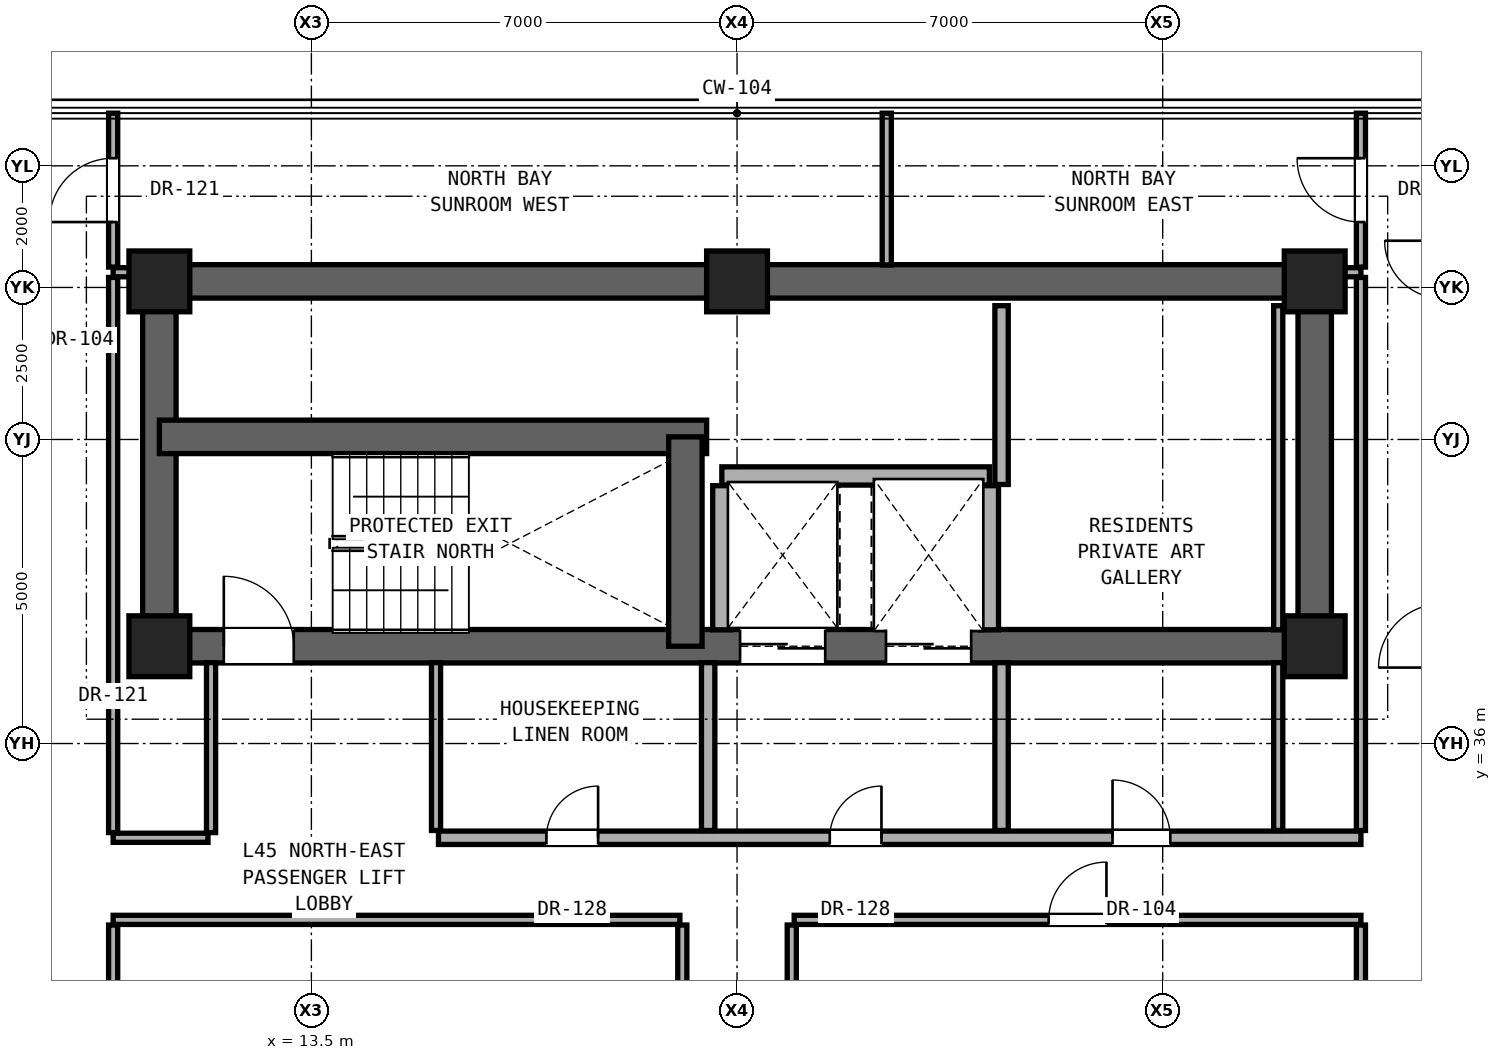
"""IFC4 building model, lengths in metres.
Left out: names, types, materials, properties, quantities, classifications, styles, units other than length and angle.
Written with IfcOpenShell. Run it as: python <this file> out.ifc"""

import sys

from ifc_helpers import new_model, si_unit, direction, frame, frame_2d, origin, origin_2d, place, context, subcontext, project, spatial, rectangle, extrude, element, fill, save


model = new_model("IFC4")
c1 = context("Model", 3, precision=1e-05, world=origin(), true_north=direction((0.0, 1.0)))
c2 = subcontext(c1, "Body", "Model", "MODEL_VIEW")
j1 = project(units=[si_unit("LENGTHUNIT", "METRE"), si_unit("PLANEANGLEUNIT", "RADIAN")], contexts=[c1])
p1 = place(None, origin())
s1 = spatial("IfcSite", under=j1, at=p1, CompositionType="ELEMENT")
p2 = place(p1, origin())
s2 = spatial("IfcBuilding", under=s1, at=p2, CompositionType="ELEMENT")
p3 = place(p2, frame((0.0, 0.0, 160.9)))
s3 = spatial("IfcBuildingStorey", under=s2, at=p3, CompositionType="ELEMENT", Elevation=160.9)
for number, where, z_axis, x_axis in (
    (1, (11.0, 37.6, 0.0), (0.0, 0.0, 1.0), (1.0, 0.0, 0.0)),
    (2, (30.0, 37.6, 0.0), (0.0, 0.0, 1.0), (1.0, 0.0, 0.0)),
    (3, (11.0, 43.6, 0.0), (0.0, 0.0, 1.0), (1.0, 0.0, 0.0)),
    (4, (20.5, 43.6, 0.0), (0.0, 0.0, 1.0), (1.0, 0.0, 0.0)),
    (5, (30.0, 43.6, 0.0), (0.0, 0.0, 1.0), (1.0, 0.0, 0.0)),
):
    element("IfcColumn", number, at=place(p3, frame(where, z_axis=z_axis, x_axis=x_axis)), inside=s3, PredefinedType="COLUMN", context=c2, shape_type="SweptSolid", body=[
        extrude(rectangle(XDim=1.0, YDim=1.0, at=origin_2d()), origin(), (0.0, 0.0, 1.0), 3.25),
    ])
p4 = place(p3, frame((11.0, 43.6, 0.0), z_axis=(0.0, 0.0, 1.0), x_axis=(1.0, 0.0, 0.0)))
e6 = element("IfcWall", 6, at=p4, inside=s3, PredefinedType="SHEAR", context=c2, shape_type="SweptSolid", body=[
    extrude(rectangle(XDim=19.0, YDim=0.55, at=frame_2d((9.5, 0.0))), origin(), (0.0, 0.0, 1.0), 3.05),
])
for number, where, z_axis, x_axis in (
    (7, (11.0, 37.6, 0.0), (0.0, 0.0, 1.0), (0.0, 1.0, 0.0)),
    (8, (30.0, 37.6, 0.0), (0.0, 0.0, 1.0), (0.0, 1.0, 0.0)),
):
    element("IfcWall", number, at=place(p3, frame(where, z_axis=z_axis, x_axis=x_axis)), inside=s3, PredefinedType="SHEAR", context=c2, shape_type="SweptSolid", body=[
        extrude(rectangle(XDim=6.0, YDim=0.55, at=frame_2d((3.0, 0.0))), origin(), (0.0, 0.0, 1.0), 3.05),
    ])
p5 = place(p3, frame((11.0, 37.6, 0.0), z_axis=(0.0, 0.0, 1.0), x_axis=(1.0, 0.0, 0.0)))
e9 = element("IfcWall", 9, at=p5, inside=s3, PredefinedType="SHEAR", context=c2, shape_type="SweptSolid", body=[
    extrude(rectangle(XDim=19.0, YDim=0.55, at=frame_2d((9.5, 0.0))), origin(), (0.0, 0.0, 1.0), 3.05),
])
p6 = place(p5, frame((1.06, 0.0, 0.0)))
e10 = element("IfcOpeningElement", 10, at=p6, cuts=e9, PredefinedType="OPENING", context=c2, shape_type="SweptSolid", body=[
    extrude(rectangle(XDim=1.15, YDim=2.2, at=frame_2d((0.575, 1.1))), frame((0.0, 0.285, 0.0), z_axis=(0.0, -1.0, 0.0), x_axis=(1.0, 0.0, 0.0)), (0.0, 0.0, 1.0), 0.57),
])
p7 = place(p5, frame((9.55, 0.0, 0.0)))
e11 = element("IfcOpeningElement", 11, at=p7, cuts=e9, PredefinedType="OPENING", context=c2, shape_type="SweptSolid", body=[
    extrude(rectangle(XDim=1.4, YDim=2.35, at=frame_2d((0.7, 1.175))), frame((0.0, 0.285, 0.0), z_axis=(0.0, -1.0, 0.0), x_axis=(1.0, 0.0, 0.0)), (0.0, 0.0, 1.0), 0.57),
])
p8 = place(p5, frame((11.95, 0.0, 0.0)))
e12 = element("IfcOpeningElement", 12, at=p8, cuts=e9, PredefinedType="OPENING", context=c2, shape_type="SweptSolid", body=[
    extrude(rectangle(XDim=1.4, YDim=2.35, at=frame_2d((0.7, 1.175))), frame((0.0, 0.285, 0.0), z_axis=(0.0, -1.0, 0.0), x_axis=(1.0, 0.0, 0.0)), (0.0, 0.0, 1.0), 0.57),
])
p9 = place(p3, frame((11.0, 41.043, 0.0), z_axis=(0.0, 0.0, 1.0), x_axis=(1.0, 0.0, 0.0)))
e13 = element("IfcWall", 13, at=p9, inside=s3, PredefinedType="SHEAR", context=c2, shape_type="SweptSolid", body=[
    extrude(rectangle(XDim=9.0, YDim=0.55, at=frame_2d((4.5, 0.0))), origin(), (0.0, 0.0, 1.0), 3.05),
])
p10 = place(p3, frame((19.65, 37.6, 0.0), z_axis=(0.0, 0.0, 1.0), x_axis=(0.0, 1.0, 0.0)))
e14 = element("IfcWall", 14, at=p10, inside=s3, PredefinedType="SHEAR", context=c2, shape_type="SweptSolid", body=[
    extrude(rectangle(XDim=3.443, YDim=0.55, at=frame_2d((1.721, 0.0))), origin(), (0.0, 0.0, 1.0), 3.05),
])
p11 = place(p3, frame((10.24, 33.1, 0.0), z_axis=(0.0, 0.0, 1.0), x_axis=(1.0, 0.0, 0.0)))
e15 = element("IfcWall", 15, at=p11, inside=s3, PredefinedType="PARTITIONING", context=c2, shape_type="SweptSolid", body=[
    extrude(rectangle(XDim=9.32, YDim=0.15, at=frame_2d((4.66, 0.0))), origin(), (0.0, 0.0, 1.0), 2.186),
])
p12 = place(p3, frame((21.44, 33.1, 0.0), z_axis=(0.0, 0.0, 1.0), x_axis=(1.0, 0.0, 0.0)))
e16 = element("IfcWall", 16, at=p12, inside=s3, PredefinedType="PARTITIONING", context=c2, shape_type="SweptSolid", body=[
    extrude(rectangle(XDim=9.32, YDim=0.15, at=frame_2d((4.66, 0.0))), origin(), (0.0, 0.0, 1.0), 2.186),
])
p13 = place(p12, frame((4.185, 0.0, 0.0)))
e17 = element("IfcOpeningElement", 17, at=p13, cuts=e16, PredefinedType="OPENING", context=c2, shape_type="SweptSolid", body=[
    extrude(rectangle(XDim=0.95, YDim=2.15, at=frame_2d((0.475, 1.075))), frame((0.0, 0.085, 0.0), z_axis=(0.0, -1.0, 0.0), x_axis=(1.0, 0.0, 0.0)), (0.0, 0.0, 1.0), 0.17),
])
p14 = place(p3, frame((10.24, 34.45, 0.0), z_axis=(0.0, 0.0, 1.0), x_axis=(1.0, 0.0, 0.0)))
e18 = element("IfcWall", 18, at=p14, inside=s3, PredefinedType="PARTITIONING", context=c2, shape_type="SweptSolid", body=[
    extrude(rectangle(XDim=1.56, YDim=0.15, at=frame_2d((0.78, 0.0))), origin(), (0.0, 0.0, 1.0), 2.186),
])
p15 = place(p3, frame((15.59, 34.45, 0.0), z_axis=(0.0, 0.0, 1.0), x_axis=(1.0, 0.0, 0.0)))
e19 = element("IfcWall", 19, at=p15, inside=s3, PredefinedType="SOLIDWALL", context=c2, shape_type="SweptSolid", body=[
    extrude(rectangle(XDim=15.17, YDim=0.22, at=frame_2d((7.585, 0.0))), origin(), (0.0, 0.0, 1.0), 2.186),
])
p16 = place(p15, frame((6.435, 0.0, 0.0)))
e20 = element("IfcOpeningElement", 20, at=p16, cuts=e19, PredefinedType="OPENING", context=c2, shape_type="SweptSolid", body=[
    extrude(rectangle(XDim=0.85, YDim=2.01, at=frame_2d((0.425, 1.005))), frame((0.0, 0.12, 0.0), z_axis=(0.0, -1.0, 0.0), x_axis=(1.0, 0.0, 0.0)), (0.0, 0.0, 1.0), 0.24),
])
p17 = place(p15, frame((11.085, 0.0, 0.0)))
e21 = element("IfcOpeningElement", 21, at=p17, cuts=e19, PredefinedType="OPENING", context=c2, shape_type="SweptSolid", body=[
    extrude(rectangle(XDim=0.95, YDim=2.15, at=frame_2d((0.475, 1.075))), frame((0.0, 0.12, 0.0), z_axis=(0.0, -1.0, 0.0), x_axis=(1.0, 0.0, 0.0)), (0.0, 0.0, 1.0), 0.24),
])
p18 = place(p15, frame((1.775, 0.0, 0.0)))
e22 = element("IfcOpeningElement", 22, at=p18, cuts=e19, PredefinedType="OPENING", context=c2, shape_type="SweptSolid", body=[
    extrude(rectangle(XDim=0.85, YDim=2.01, at=frame_2d((0.425, 1.005))), frame((0.0, 0.12, 0.0), z_axis=(0.0, -1.0, 0.0), x_axis=(1.0, 0.0, 0.0)), (0.0, 0.0, 1.0), 0.24),
])
p19 = place(p3, frame((20.25, 40.4, 0.0), z_axis=(0.0, 0.0, 1.0), x_axis=(1.0, 0.0, 0.0)))
e23 = element("IfcWall", 23, at=p19, inside=s3, PredefinedType="SOLIDWALL", context=c2, shape_type="SweptSolid", body=[
    extrude(rectangle(XDim=4.4, YDim=0.3, at=frame_2d((2.2, 0.0))), origin(), (0.0, 0.0, 1.0), 3.05),
])
for number, where, z_axis, x_axis in (
    (24, (10.24, 43.75, 0.0), (0.0, 0.0, 1.0), (1.0, 0.0, 0.0)),
    (25, (30.27, 43.75, 0.0), (0.0, 0.0, 1.0), (1.0, 0.0, 0.0)),
):
    element("IfcWall", number, at=place(p3, frame(where, z_axis=z_axis, x_axis=x_axis)), inside=s3, PredefinedType="PARTITIONING", context=c2, shape_type="SweptSolid", body=[
        extrude(rectangle(XDim=0.49, YDim=0.15, at=frame_2d((0.245, 0.0))), origin(), (0.0, 0.0, 1.0), 3.05),
    ])
p20 = place(p3, frame((10.24, 27.485, 0.0), z_axis=(0.0, 0.0, 1.0), x_axis=(0.0, 1.0, 0.0)))
e26 = element("IfcWall", 26, at=p20, inside=s3, PredefinedType="PARTITIONING", context=c2, shape_type="SweptSolid", body=[
    extrude(rectangle(XDim=5.53, YDim=0.15, at=frame_2d((2.765, 0.0))), origin(), (0.0, 0.0, 1.0), 2.346),
])
p21 = place(p20, frame((2.29, 0.0, 0.0)))
e27 = element("IfcOpeningElement", 27, at=p21, cuts=e26, PredefinedType="OPENING", context=c2, shape_type="SweptSolid", body=[
    extrude(rectangle(XDim=0.95, YDim=2.15, at=frame_2d((0.475, 1.075))), frame((0.0, 0.085, 0.0), z_axis=(0.0, -1.0, 0.0), x_axis=(1.0, 0.0, 0.0)), (0.0, 0.0, 1.0), 0.17),
])
p22 = place(p3, frame((10.24, 34.535, 0.0), z_axis=(0.0, 0.0, 1.0), x_axis=(0.0, 1.0, 0.0)))
e28 = element("IfcWall", 28, at=p22, inside=s3, PredefinedType="PARTITIONING", context=c2, shape_type="SweptSolid", body=[
    extrude(rectangle(XDim=9.13, YDim=0.15, at=frame_2d((4.565, 0.0))), origin(), (0.0, 0.0, 1.0), 2.442),
])
p23 = place(p3, frame((10.24, 43.835, 0.0), z_axis=(0.0, 0.0, 1.0), x_axis=(0.0, 1.0, 0.0)))
e29 = element("IfcWall", 29, at=p23, inside=s3, PredefinedType="PARTITIONING", context=c2, shape_type="SweptSolid", body=[
    extrude(rectangle(XDim=2.531, YDim=0.15, at=frame_2d((1.266, 0.0))), origin(), (0.0, 0.0, 1.0), 3.05),
])
p24 = place(p23, frame((0.74, 0.0, 0.0)))
e30 = element("IfcOpeningElement", 30, at=p24, cuts=e29, PredefinedType="OPENING", context=c2, shape_type="SweptSolid", body=[
    extrude(rectangle(XDim=1.05, YDim=2.2, at=frame_2d((0.525, 1.1))), frame((0.0, 0.085, 0.0), z_axis=(0.0, -1.0, 0.0), x_axis=(1.0, 0.0, 0.0)), (0.0, 0.0, 1.0), 0.17),
])
p25 = place(p3, frame((11.85, 34.535, 0.0), z_axis=(0.0, 0.0, 1.0), x_axis=(0.0, 1.0, 0.0)))
e31 = element("IfcWall", 31, at=p25, inside=s3, PredefinedType="PARTITIONING", context=c2, shape_type="SweptSolid", body=[
    extrude(rectangle(XDim=2.795, YDim=0.15, at=frame_2d((1.397, 0.0))), origin(), (0.0, 0.0, 1.0), 3.05),
])
p26 = place(p3, frame((15.55, 34.57, 0.0), z_axis=(0.0, 0.0, 1.0), x_axis=(0.0, 1.0, 0.0)))
e32 = element("IfcWall", 32, at=p26, inside=s3, PredefinedType="PARTITIONING", context=c2, shape_type="SweptSolid", body=[
    extrude(rectangle(XDim=2.76, YDim=0.15, at=frame_2d((1.38, 0.0))), origin(), (0.0, 0.0, 1.0), 3.05),
])
p27 = place(p3, frame((19.6, 27.485, 0.0), z_axis=(0.0, 0.0, 1.0), x_axis=(0.0, 1.0, 0.0)))
e33 = element("IfcWall", 33, at=p27, inside=s3, PredefinedType="PARTITIONING", context=c2, shape_type="SweptSolid", body=[
    extrude(rectangle(XDim=5.53, YDim=0.15, at=frame_2d((2.765, 0.0))), origin(), (0.0, 0.0, 1.0), 2.186),
])
p28 = place(p3, frame((20.025, 34.57, 0.0), z_axis=(0.0, 0.0, 1.0), x_axis=(0.0, 1.0, 0.0)))
e34 = element("IfcWall", 34, at=p28, inside=s3, PredefinedType="SOLIDWALL", context=c2, shape_type="SweptSolid", body=[
    extrude(rectangle(XDim=2.76, YDim=0.22, at=frame_2d((1.38, 0.0))), origin(), (0.0, 0.0, 1.0), 3.05),
])
p29 = place(p3, frame((20.25, 37.87, 0.0), z_axis=(0.0, 0.0, 1.0), x_axis=(0.0, 1.0, 0.0)))
e35 = element("IfcWall", 35, at=p29, inside=s3, PredefinedType="SOLIDWALL", context=c2, shape_type="SweptSolid", body=[
    extrude(rectangle(XDim=2.37, YDim=0.3, at=frame_2d((1.185, 0.0))), origin(), (0.0, 0.0, 1.0), 3.05),
])
p30 = place(p3, frame((21.4, 27.485, 0.0), z_axis=(0.0, 0.0, 1.0), x_axis=(0.0, 1.0, 0.0)))
e36 = element("IfcWall", 36, at=p30, inside=s3, PredefinedType="PARTITIONING", context=c2, shape_type="SweptSolid", body=[
    extrude(rectangle(XDim=5.53, YDim=0.15, at=frame_2d((2.765, 0.0))), origin(), (0.0, 0.0, 1.0), 2.186),
])
p31 = place(p3, frame((22.962, 43.87, 0.0), z_axis=(0.0, 0.0, 1.0), x_axis=(0.0, 1.0, 0.0)))
e37 = element("IfcWall", 37, at=p31, inside=s3, PredefinedType="PARTITIONING", context=c2, shape_type="SweptSolid", body=[
    extrude(rectangle(XDim=2.496, YDim=0.15, at=frame_2d((1.248, 0.0))), origin(), (0.0, 0.0, 1.0), 3.05),
])
p32 = place(p3, frame((24.65, 37.87, 0.0), z_axis=(0.0, 0.0, 1.0), x_axis=(0.0, 1.0, 0.0)))
e38 = element("IfcWall", 38, at=p32, inside=s3, PredefinedType="SOLIDWALL", context=c2, shape_type="SweptSolid", body=[
    extrude(rectangle(XDim=2.37, YDim=0.3, at=frame_2d((1.185, 0.0))), origin(), (0.0, 0.0, 1.0), 3.05),
])
p33 = place(p3, frame((24.85, 34.57, 0.0), z_axis=(0.0, 0.0, 1.0), x_axis=(0.0, 1.0, 0.0)))
e39 = element("IfcWall", 39, at=p33, inside=s3, PredefinedType="SOLIDWALL", context=c2, shape_type="SweptSolid", body=[
    extrude(rectangle(XDim=2.76, YDim=0.22, at=frame_2d((1.38, 0.0))), origin(), (0.0, 0.0, 1.0), 3.05),
])
p34 = place(p3, frame((24.85, 40.26, 0.0), z_axis=(0.0, 0.0, 1.0), x_axis=(0.0, 1.0, 0.0)))
e40 = element("IfcWall", 40, at=p34, inside=s3, PredefinedType="SOLIDWALL", context=c2, shape_type="SweptSolid", body=[
    extrude(rectangle(XDim=2.94, YDim=0.22, at=frame_2d((1.47, 0.0))), origin(), (0.0, 0.0, 1.0), 3.05),
])
p35 = place(p3, frame((29.4, 34.57, 0.0), z_axis=(0.0, 0.0, 1.0), x_axis=(0.0, 1.0, 0.0)))
e41 = element("IfcWall", 41, at=p35, inside=s3, PredefinedType="PARTITIONING", context=c2, shape_type="SweptSolid", body=[
    extrude(rectangle(XDim=2.76, YDim=0.15, at=frame_2d((1.38, 0.0))), origin(), (0.0, 0.0, 1.0), 3.05),
])
p36 = place(p3, frame((29.4, 37.87, 0.0), z_axis=(0.0, 0.0, 1.0), x_axis=(0.0, 1.0, 0.0)))
e42 = element("IfcWall", 42, at=p36, inside=s3, PredefinedType="PARTITIONING", context=c2, shape_type="SweptSolid", body=[
    extrude(rectangle(XDim=5.33, YDim=0.15, at=frame_2d((2.665, 0.0))), origin(), (0.0, 0.0, 1.0), 3.05),
])
p37 = place(p3, frame((30.76, 27.485, 0.0), z_axis=(0.0, 0.0, 1.0), x_axis=(0.0, 1.0, 0.0)))
e43 = element("IfcWall", 43, at=p37, inside=s3, PredefinedType="PARTITIONING", context=c2, shape_type="SweptSolid", body=[
    extrude(rectangle(XDim=5.53, YDim=0.15, at=frame_2d((2.765, 0.0))), origin(), (0.0, 0.0, 1.0), 2.346),
])
p38 = place(p3, frame((30.76, 34.57, 0.0), z_axis=(0.0, 0.0, 1.0), x_axis=(0.0, 1.0, 0.0)))
e44 = element("IfcWall", 44, at=p38, inside=s3, PredefinedType="PARTITIONING", context=c2, shape_type="SweptSolid", body=[
    extrude(rectangle(XDim=9.095, YDim=0.15, at=frame_2d((4.547, 0.0))), origin(), (0.0, 0.0, 1.0), 2.442),
])
p39 = place(p3, frame((30.76, 43.835, 0.0), z_axis=(0.0, 0.0, 1.0), x_axis=(0.0, 1.0, 0.0)))
e45 = element("IfcWall", 45, at=p39, inside=s3, PredefinedType="PARTITIONING", context=c2, shape_type="SweptSolid", body=[
    extrude(rectangle(XDim=2.531, YDim=0.15, at=frame_2d((1.266, 0.0))), origin(), (0.0, 0.0, 1.0), 3.05),
])
p40 = place(p39, frame((0.74, 0.0, 0.0)))
e46 = element("IfcOpeningElement", 46, at=p40, cuts=e45, PredefinedType="OPENING", context=c2, shape_type="SweptSolid", body=[
    extrude(rectangle(XDim=1.05, YDim=2.2, at=frame_2d((0.525, 1.1))), frame((0.0, 0.085, 0.0), z_axis=(0.0, -1.0, 0.0), x_axis=(1.0, 0.0, 0.0)), (0.0, 0.0, 1.0), 0.17),
])
p41 = place(p6, origin())
e47 = element("IfcDoor", 47, at=p41, inside=s3, OperationType="SINGLE_SWING_LEFT", PredefinedType="DOOR", context=c2, shape_type="SweptSolid", body=[
    extrude(rectangle(XDim=1.15, YDim=2.2, at=frame_2d((0.575, 1.1))), frame((0.0, 0.025, 0.0), z_axis=(0.0, -1.0, 0.0), x_axis=(1.0, 0.0, 0.0)), (0.0, 0.0, 1.0), 0.05),
])
fill(e10, e47)
p42 = place(p16, origin())
e48 = element("IfcDoor", 48, at=p42, inside=s3, OperationType="SINGLE_SWING_RIGHT", PredefinedType="DOOR", context=c2, shape_type="SweptSolid", body=[
    extrude(rectangle(XDim=0.85, YDim=2.01, at=frame_2d((0.425, 1.005))), frame((0.0, 0.025, 0.0), z_axis=(0.0, -1.0, 0.0), x_axis=(1.0, 0.0, 0.0)), (0.0, 0.0, 1.0), 0.05),
])
fill(e20, e48)
p43 = place(p17, origin())
e49 = element("IfcDoor", 49, at=p43, inside=s3, OperationType="SINGLE_SWING_LEFT", PredefinedType="DOOR", context=c2, shape_type="SweptSolid", body=[
    extrude(rectangle(XDim=0.95, YDim=2.15, at=frame_2d((0.475, 1.075))), frame((0.0, 0.025, 0.0), z_axis=(0.0, -1.0, 0.0), x_axis=(1.0, 0.0, 0.0)), (0.0, 0.0, 1.0), 0.05),
])
fill(e21, e49)
p44 = place(p18, origin())
e50 = element("IfcDoor", 50, at=p44, inside=s3, OperationType="SINGLE_SWING_RIGHT", PredefinedType="DOOR", context=c2, shape_type="SweptSolid", body=[
    extrude(rectangle(XDim=0.85, YDim=2.01, at=frame_2d((0.425, 1.005))), frame((0.0, 0.025, 0.0), z_axis=(0.0, -1.0, 0.0), x_axis=(1.0, 0.0, 0.0)), (0.0, 0.0, 1.0), 0.05),
])
fill(e22, e50)
p45 = place(p13, origin())
e51 = element("IfcDoor", 51, at=p45, inside=s3, OperationType="SINGLE_SWING_RIGHT", PredefinedType="DOOR", context=c2, shape_type="SweptSolid", body=[
    extrude(rectangle(XDim=0.95, YDim=2.15, at=frame_2d((0.475, 1.075))), frame((0.0, 0.025, 0.0), z_axis=(0.0, -1.0, 0.0), x_axis=(1.0, 0.0, 0.0)), (0.0, 0.0, 1.0), 0.05),
])
fill(e17, e51)
p46 = place(p24, origin())
e52 = element("IfcDoor", 52, at=p46, inside=s3, OperationType="SINGLE_SWING_LEFT", PredefinedType="DOOR", context=c2, shape_type="SweptSolid", body=[
    extrude(rectangle(XDim=1.05, YDim=2.2, at=frame_2d((0.525, 1.1))), frame((0.0, 0.025, 0.0), z_axis=(0.0, -1.0, 0.0), x_axis=(1.0, 0.0, 0.0)), (0.0, 0.0, 1.0), 0.05),
])
fill(e30, e52)
p47 = place(p40, origin())
e53 = element("IfcDoor", 53, at=p47, inside=s3, OperationType="SINGLE_SWING_RIGHT", PredefinedType="DOOR", context=c2, shape_type="SweptSolid", body=[
    extrude(rectangle(XDim=1.05, YDim=2.2, at=frame_2d((0.525, 1.1))), frame((0.0, 0.025, 0.0), z_axis=(0.0, -1.0, 0.0), x_axis=(1.0, 0.0, 0.0)), (0.0, 0.0, 1.0), 0.05),
])
fill(e46, e53)
p48 = place(p7, origin())
e54 = element("IfcDoor", 54, at=p48, inside=s3, OperationType="DOUBLE_DOOR_SLIDING", PredefinedType="DOOR", context=c2, shape_type="SweptSolid", body=[
    extrude(rectangle(XDim=1.4, YDim=2.35, at=frame_2d((0.7, 1.175))), frame((0.0, 0.025, 0.0), z_axis=(0.0, -1.0, 0.0), x_axis=(1.0, 0.0, 0.0)), (0.0, 0.0, 1.0), 0.05),
])
fill(e11, e54)
p49 = place(p8, origin())
e55 = element("IfcDoor", 55, at=p49, inside=s3, OperationType="DOUBLE_DOOR_SLIDING", PredefinedType="DOOR", context=c2, shape_type="SweptSolid", body=[
    extrude(rectangle(XDim=1.4, YDim=2.35, at=frame_2d((0.7, 1.175))), frame((0.0, 0.025, 0.0), z_axis=(0.0, -1.0, 0.0), x_axis=(1.0, 0.0, 0.0)), (0.0, 0.0, 1.0), 0.05),
])
fill(e12, e55)
save(model, sys.argv[1])
